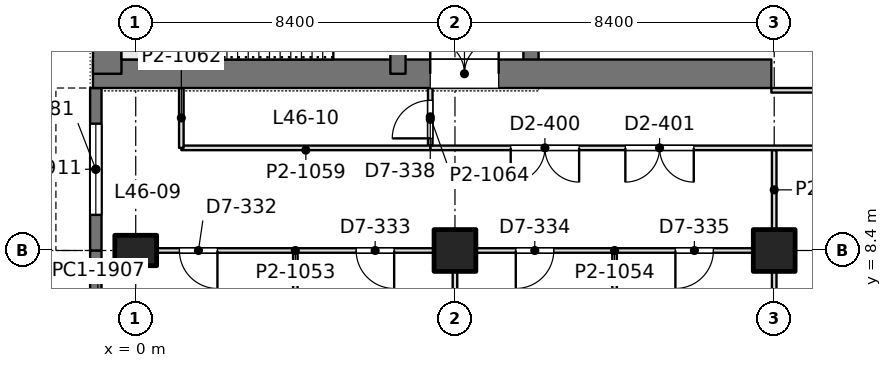
"""IFC4 building model, lengths in metres.
Left out: names, types, materials, properties, quantities, classifications, styles, units other than length and angle.
Written with IfcOpenShell. Run it as: python <this file> out.ifc"""

import sys

from ifc_helpers import new_model, si_unit, direction, frame, frame_2d, origin, origin_2d, place, context, subcontext, project, spatial, rectangle, extrude, element, fill, save


model = new_model("IFC4")
c1 = context("Model", 3, precision=1e-05, world=origin(), true_north=direction((0.0, 1.0)))
c2 = subcontext(c1, "Body", "Model", "MODEL_VIEW")
j1 = project(units=[si_unit("LENGTHUNIT", "METRE"), si_unit("PLANEANGLEUNIT", "RADIAN")], contexts=[c1])
p1 = place(None, origin())
s1 = spatial("IfcSite", under=j1, at=p1, CompositionType="ELEMENT")
p2 = place(p1, origin())
s2 = spatial("IfcBuilding", under=s1, at=p2, CompositionType="ELEMENT")
p3 = place(p2, frame((0.0, 0.0, 202.8)))
s3 = spatial("IfcBuildingStorey", under=s2, at=p3, CompositionType="ELEMENT", Elevation=202.8)
p4 = place(p3, frame((0.0, 8.4, 0.0), z_axis=(0.0, 0.0, 1.0), x_axis=(0.0, 1.0, 0.0)))
e1 = element("IfcColumn", 1, at=p4, inside=s3, PredefinedType="COLUMN", context=c2, shape_type="SweptSolid", body=[
    extrude(rectangle(XDim=0.8, YDim=1.1, at=origin_2d()), origin(), (0.0, 0.0, 1.0), 4.2),
])
for number, where, z_axis, x_axis in (
    (2, (8.4, 8.4, 0.0), (0.0, 0.0, 1.0), (1.0, 0.0, 0.0)),
    (3, (16.8, 8.4, 0.0), (0.0, 0.0, 1.0), (1.0, 0.0, 0.0)),
):
    element("IfcColumn", number, at=place(p3, frame(where, z_axis=z_axis, x_axis=x_axis)), inside=s3, PredefinedType="COLUMN", context=c2, shape_type="SweptSolid", body=[
        extrude(rectangle(XDim=1.1, YDim=1.1, at=origin_2d()), origin(), (0.0, 0.0, 1.0), 4.2),
    ])
p5 = place(p3, frame((-1.125, 13.05, 0.0), z_axis=(0.0, 0.0, 1.0), x_axis=(1.0, 0.0, 0.0)))
e4 = element("IfcWall", 4, at=p5, inside=s3, PredefinedType="SHEAR", context=c2, shape_type="SweptSolid", body=[
    extrude(rectangle(XDim=17.85, YDim=0.75, at=frame_2d((8.925, 0.0))), origin(), (0.0, 0.0, 1.0), 4.2),
])
p6 = place(p5, frame((8.875, 0.0, 0.0)))
e5 = element("IfcOpeningElement", 5, at=p6, cuts=e4, PredefinedType="OPENING", context=c2, shape_type="SweptSolid", body=[
    extrude(rectangle(XDim=1.8, YDim=2.4, at=frame_2d((0.9, 1.2))), frame((0.0, 0.385, 0.0), z_axis=(0.0, -1.0, 0.0), x_axis=(1.0, 0.0, 0.0)), (0.0, 0.0, 1.0), 0.77),
])
p7 = place(p3, frame((-0.75, 13.05, 0.0), z_axis=(0.0, 0.0, 1.0), x_axis=(0.0, 1.0, 0.0)))
e6 = element("IfcWall", 6, at=p7, inside=s3, PredefinedType="SHEAR", context=c2, shape_type="SweptSolid", body=[
    extrude(rectangle(XDim=24.3, YDim=0.75, at=frame_2d((12.15, 0.0))), origin(), (0.0, 0.0, 1.0), 4.2),
])
p8 = place(p3, frame((6.9, 13.05, 0.0), z_axis=(0.0, 0.0, 1.0), x_axis=(0.0, 1.0, 0.0)))
e7 = element("IfcWall", 7, at=p8, inside=s3, PredefinedType="SHEAR", context=c2, shape_type="SweptSolid", body=[
    extrude(rectangle(XDim=24.3, YDim=0.4, at=frame_2d((12.15, 0.0))), origin(), (0.0, 0.0, 1.0), 4.2),
])
p9 = place(p8, frame((1.3, 0.0, 0.0)))
e8 = element("IfcOpeningElement", 8, at=p9, cuts=e7, PredefinedType="OPENING", context=c2, shape_type="SweptSolid", body=[
    extrude(rectangle(XDim=1.0, YDim=2.2, at=frame_2d((0.5, 1.1))), frame((0.0, 0.21, 0.0), z_axis=(0.0, -1.0, 0.0), x_axis=(1.0, 0.0, 0.0)), (0.0, 0.0, 1.0), 0.42),
])
p10 = place(p8, frame((22.0, 0.0, 0.0)))
e9 = element("IfcOpeningElement", 9, at=p10, cuts=e7, PredefinedType="OPENING", context=c2, shape_type="SweptSolid", body=[
    extrude(rectangle(XDim=1.0, YDim=2.2, at=frame_2d((0.5, 1.1))), frame((0.0, 0.21, 0.0), z_axis=(0.0, -1.0, 0.0), x_axis=(1.0, 0.0, 0.0)), (0.0, 0.0, 1.0), 0.42),
])
p11 = place(p8, frame((5.55, 0.0, 0.0)))
e10 = element("IfcOpeningElement", 10, at=p11, cuts=e7, PredefinedType="OPENING", context=c2, shape_type="SweptSolid", body=[
    extrude(rectangle(XDim=1.0, YDim=2.2, at=frame_2d((0.5, 1.1))), frame((0.0, 0.21, 0.0), z_axis=(0.0, -1.0, 0.0), x_axis=(1.0, 0.0, 0.0)), (0.0, 0.0, 1.0), 0.42),
])
p12 = place(p8, frame((9.55, 0.0, 0.0)))
e11 = element("IfcOpeningElement", 11, at=p12, cuts=e7, PredefinedType="OPENING", context=c2, shape_type="SweptSolid", body=[
    extrude(rectangle(XDim=1.0, YDim=2.2, at=frame_2d((0.5, 1.1))), frame((0.0, 0.21, 0.0), z_axis=(0.0, -1.0, 0.0), x_axis=(1.0, 0.0, 0.0)), (0.0, 0.0, 1.0), 0.42),
])
p13 = place(p8, frame((12.8, 0.0, 0.0)))
e12 = element("IfcOpeningElement", 12, at=p13, cuts=e7, PredefinedType="OPENING", context=c2, shape_type="SweptSolid", body=[
    extrude(rectangle(XDim=1.1, YDim=2.2, at=frame_2d((0.55, 1.1))), frame((0.0, 0.21, 0.0), z_axis=(0.0, -1.0, 0.0), x_axis=(1.0, 0.0, 0.0)), (0.0, 0.0, 1.0), 0.42),
])
p14 = place(p8, frame((15.538, 0.0, 0.0)))
e13 = element("IfcOpeningElement", 13, at=p14, cuts=e7, PredefinedType="OPENING", context=c2, shape_type="SweptSolid", body=[
    extrude(rectangle(XDim=1.1, YDim=2.2, at=frame_2d((0.55, 1.1))), frame((0.0, 0.21, 0.0), z_axis=(0.0, -1.0, 0.0), x_axis=(1.0, 0.0, 0.0)), (0.0, 0.0, 1.0), 0.42),
])
p15 = place(p8, frame((18.262, 0.0, 0.0)))
e14 = element("IfcOpeningElement", 14, at=p15, cuts=e7, PredefinedType="OPENING", context=c2, shape_type="SweptSolid", body=[
    extrude(rectangle(XDim=1.1, YDim=2.2, at=frame_2d((0.55, 1.1))), frame((0.0, 0.21, 0.0), z_axis=(0.0, -1.0, 0.0), x_axis=(1.0, 0.0, 0.0)), (0.0, 0.0, 1.0), 0.42),
])
p16 = place(p3, frame((10.4, 13.05, 0.0), z_axis=(0.0, 0.0, 1.0), x_axis=(0.0, 1.0, 0.0)))
e15 = element("IfcWall", 15, at=p16, inside=s3, PredefinedType="SHEAR", context=c2, shape_type="SweptSolid", body=[
    extrude(rectangle(XDim=24.3, YDim=0.4, at=frame_2d((12.15, 0.0))), origin(), (0.0, 0.0, 1.0), 4.2),
])
p17 = place(p16, frame((15.75, 0.0, 0.0)))
e16 = element("IfcOpeningElement", 16, at=p17, cuts=e15, PredefinedType="OPENING", context=c2, shape_type="SweptSolid", body=[
    extrude(rectangle(XDim=1.1, YDim=2.2, at=frame_2d((0.55, 1.1))), frame((0.0, 0.21, 0.0), z_axis=(0.0, -1.0, 0.0), x_axis=(1.0, 0.0, 0.0)), (0.0, 0.0, 1.0), 0.42),
])
p18 = place(p16, frame((18.6, 0.0, 0.0)))
e17 = element("IfcOpeningElement", 17, at=p18, cuts=e15, PredefinedType="OPENING", context=c2, shape_type="SweptSolid", body=[
    extrude(rectangle(XDim=1.1, YDim=2.2, at=frame_2d((0.55, 1.1))), frame((0.0, 0.21, 0.0), z_axis=(0.0, -1.0, 0.0), x_axis=(1.0, 0.0, 0.0)), (0.0, 0.0, 1.0), 0.42),
])
p19 = place(p16, frame((21.45, 0.0, 0.0)))
e18 = element("IfcOpeningElement", 18, at=p19, cuts=e15, PredefinedType="OPENING", context=c2, shape_type="SweptSolid", body=[
    extrude(rectangle(XDim=1.1, YDim=2.2, at=frame_2d((0.55, 1.1))), frame((0.0, 0.21, 0.0), z_axis=(0.0, -1.0, 0.0), x_axis=(1.0, 0.0, 0.0)), (0.0, 0.0, 1.0), 0.42),
])
p20 = place(p16, frame((8.65, 0.0, 0.0)))
e19 = element("IfcOpeningElement", 19, at=p20, cuts=e15, PredefinedType="OPENING", context=c2, shape_type="SweptSolid", body=[
    extrude(rectangle(XDim=1.8, YDim=2.4, at=frame_2d((0.9, 1.2))), frame((0.0, 0.21, 0.0), z_axis=(0.0, -1.0, 0.0), x_axis=(1.0, 0.0, 0.0)), (0.0, 0.0, 1.0), 0.42),
])
p21 = place(p3, frame((-1.05, 5.915, 0.0), z_axis=(0.0, 0.0, 1.0), x_axis=(0.0, 1.0, 0.0)))
e20 = element("IfcWall", 20, at=p21, inside=s3, PredefinedType="SOLIDWALL", context=c2, shape_type="SweptSolid", body=[
    extrude(rectangle(XDim=2.485, YDim=0.3, at=frame_2d((1.243, 0.0))), origin(), (0.0, 0.0, 1.0), 4.05),
])
p22 = place(p3, frame((-1.05, 8.4, 0.0), z_axis=(0.0, 0.0, 1.0), x_axis=(0.0, 1.0, 0.0)))
e21 = element("IfcWall", 21, at=p22, inside=s3, PredefinedType="SOLIDWALL", context=c2, shape_type="SweptSolid", body=[
    extrude(rectangle(XDim=4.275, YDim=0.3, at=frame_2d((2.138, 0.0))), origin(), (0.0, 0.0, 1.0), 4.05),
])
p23 = place(p22, frame((0.938, 0.0, 0.9)))
e22 = element("IfcOpeningElement", 22, at=p23, cuts=e21, PredefinedType="OPENING", context=c2, shape_type="SweptSolid", body=[
    extrude(rectangle(XDim=2.4, YDim=1.9, at=frame_2d((1.2, 0.95))), frame((0.0, 0.16, 0.0), z_axis=(0.0, -1.0, 0.0), x_axis=(1.0, 0.0, 0.0)), (0.0, 0.0, 1.0), 0.32),
])
p24 = place(p3, frame((0.549, 8.4, 0.0), z_axis=(0.0, 0.0, 1.0), x_axis=(1.0, 0.0, 0.0)))
e23 = element("IfcWall", 23, at=p24, inside=s3, PredefinedType="PARTITIONING", context=c2, shape_type="SweptSolid", body=[
    extrude(rectangle(XDim=7.302, YDim=0.12, at=frame_2d((3.651, 0.0))), origin(), (0.0, 0.0, 1.0), 3.55),
])
p25 = place(p24, frame((0.601, 0.0, 0.0)))
e24 = element("IfcOpeningElement", 24, at=p25, cuts=e23, PredefinedType="OPENING", context=c2, shape_type="SweptSolid", body=[
    extrude(rectangle(XDim=1.0, YDim=2.4, at=frame_2d((0.5, 1.2))), frame((0.0, 0.07, 0.0), z_axis=(0.0, -1.0, 0.0), x_axis=(1.0, 0.0, 0.0)), (0.0, 0.0, 1.0), 0.14),
])
p26 = place(p24, frame((5.251, 0.0, 0.0)))
e25 = element("IfcOpeningElement", 25, at=p26, cuts=e23, PredefinedType="OPENING", context=c2, shape_type="SweptSolid", body=[
    extrude(rectangle(XDim=1.0, YDim=2.4, at=frame_2d((0.5, 1.2))), frame((0.0, 0.07, 0.0), z_axis=(0.0, -1.0, 0.0), x_axis=(1.0, 0.0, 0.0)), (0.0, 0.0, 1.0), 0.14),
])
p27 = place(p3, frame((8.949, 8.4, 0.0), z_axis=(0.0, 0.0, 1.0), x_axis=(1.0, 0.0, 0.0)))
e26 = element("IfcWall", 26, at=p27, inside=s3, PredefinedType="PARTITIONING", context=c2, shape_type="SweptSolid", body=[
    extrude(rectangle(XDim=7.302, YDim=0.12, at=frame_2d((3.651, 0.0))), origin(), (0.0, 0.0, 1.0), 3.55),
])
p28 = place(p27, frame((1.051, 0.0, 0.0)))
e27 = element("IfcOpeningElement", 27, at=p28, cuts=e26, PredefinedType="OPENING", context=c2, shape_type="SweptSolid", body=[
    extrude(rectangle(XDim=1.0, YDim=2.4, at=frame_2d((0.5, 1.2))), frame((0.0, 0.07, 0.0), z_axis=(0.0, -1.0, 0.0), x_axis=(1.0, 0.0, 0.0)), (0.0, 0.0, 1.0), 0.14),
])
p29 = place(p27, frame((5.251, 0.0, 0.0)))
e28 = element("IfcOpeningElement", 28, at=p29, cuts=e26, PredefinedType="OPENING", context=c2, shape_type="SweptSolid", body=[
    extrude(rectangle(XDim=1.0, YDim=2.4, at=frame_2d((0.5, 1.2))), frame((0.0, 0.07, 0.0), z_axis=(0.0, -1.0, 0.0), x_axis=(1.0, 0.0, 0.0)), (0.0, 0.0, 1.0), 0.14),
])
p30 = place(p3, frame((4.2, 4.7, 0.0), z_axis=(0.0, 0.0, 1.0), x_axis=(0.0, 1.0, 0.0)))
e29 = element("IfcWall", 29, at=p30, inside=s3, PredefinedType="PARTITIONING", context=c2, shape_type="SweptSolid", body=[
    extrude(rectangle(XDim=3.642, YDim=0.12, at=frame_2d((1.821, 0.0))), origin(), (0.0, 0.0, 1.0), 3.55),
])
p31 = place(p3, frame((8.4, 6.149, 0.0), z_axis=(0.0, 0.0, 1.0), x_axis=(0.0, 1.0, 0.0)))
e30 = element("IfcWall", 30, at=p31, inside=s3, PredefinedType="PARTITIONING", context=c2, shape_type="SweptSolid", body=[
    extrude(rectangle(XDim=1.702, YDim=0.12, at=frame_2d((0.851, 0.0))), origin(), (0.0, 0.0, 1.0), 3.69),
])
p32 = place(p3, frame((12.6, 4.7, 0.0), z_axis=(0.0, 0.0, 1.0), x_axis=(0.0, 1.0, 0.0)))
e31 = element("IfcWall", 31, at=p32, inside=s3, PredefinedType="PARTITIONING", context=c2, shape_type="SweptSolid", body=[
    extrude(rectangle(XDim=3.642, YDim=0.12, at=frame_2d((1.821, 0.0))), origin(), (0.0, 0.0, 1.0), 3.55),
])
p33 = place(p3, frame((16.8, 6.149, 0.0), z_axis=(0.0, 0.0, 1.0), x_axis=(0.0, 1.0, 0.0)))
e32 = element("IfcWall", 32, at=p33, inside=s3, PredefinedType="PARTITIONING", context=c2, shape_type="SweptSolid", body=[
    extrude(rectangle(XDim=1.702, YDim=0.12, at=frame_2d((0.851, 0.0))), origin(), (0.0, 0.0, 1.0), 3.69),
])
p34 = place(p3, frame((16.8, 8.949, 0.0), z_axis=(0.0, 0.0, 1.0), x_axis=(0.0, 1.0, 0.0)))
e33 = element("IfcWall", 33, at=p34, inside=s3, PredefinedType="PARTITIONING", context=c2, shape_type="SweptSolid", body=[
    extrude(rectangle(XDim=2.093, YDim=0.12, at=frame_2d((1.046, 0.0))), origin(), (0.0, 0.0, 1.0), 3.69),
])
p35 = place(p3, frame((7.748, 11.1, 0.0), z_axis=(0.0, 0.0, 1.0), x_axis=(1.0, 0.0, 0.0)))
e34 = element("IfcWall", 34, at=p35, inside=s3, PredefinedType="PARTITIONING", context=c2, shape_type="SweptSolid", body=[
    extrude(rectangle(XDim=34.904, YDim=0.12, at=frame_2d((17.452, 0.0))), origin(), (0.0, 0.0, 1.0), 3.55),
])
p36 = place(p35, frame((2.119, 0.0, 0.0)))
e35 = element("IfcOpeningElement", 35, at=p36, cuts=e34, PredefinedType="OPENING", context=c2, shape_type="SweptSolid", body=[
    extrude(rectangle(XDim=1.8, YDim=2.2, at=frame_2d((0.9, 1.1))), frame((0.0, 0.07, 0.0), z_axis=(0.0, -1.0, 0.0), x_axis=(1.0, 0.0, 0.0)), (0.0, 0.0, 1.0), 0.14),
])
p37 = place(p35, frame((5.135, 0.0, 0.0)))
e36 = element("IfcOpeningElement", 36, at=p37, cuts=e34, PredefinedType="OPENING", context=c2, shape_type="SweptSolid", body=[
    extrude(rectangle(XDim=1.8, YDim=2.2, at=frame_2d((0.9, 1.1))), frame((0.0, 0.07, 0.0), z_axis=(0.0, -1.0, 0.0), x_axis=(1.0, 0.0, 0.0)), (0.0, 0.0, 1.0), 0.14),
])
p38 = place(p35, frame((13.752, 0.0, 0.0)))
e37 = element("IfcOpeningElement", 37, at=p38, cuts=e34, PredefinedType="OPENING", context=c2, shape_type="SweptSolid", body=[
    extrude(rectangle(XDim=1.8, YDim=2.2, at=frame_2d((0.9, 1.1))), frame((0.0, 0.07, 0.0), z_axis=(0.0, -1.0, 0.0), x_axis=(1.0, 0.0, 0.0)), (0.0, 0.0, 1.0), 0.14),
])
p39 = place(p35, frame((19.352, 0.0, 0.0)))
e38 = element("IfcOpeningElement", 38, at=p39, cuts=e34, PredefinedType="OPENING", context=c2, shape_type="SweptSolid", body=[
    extrude(rectangle(XDim=1.8, YDim=2.2, at=frame_2d((0.9, 1.1))), frame((0.0, 0.07, 0.0), z_axis=(0.0, -1.0, 0.0), x_axis=(1.0, 0.0, 0.0)), (0.0, 0.0, 1.0), 0.14),
])
p40 = place(p35, frame((27.969, 0.0, 0.0)))
e39 = element("IfcOpeningElement", 39, at=p40, cuts=e34, PredefinedType="OPENING", context=c2, shape_type="SweptSolid", body=[
    extrude(rectangle(XDim=1.8, YDim=2.2, at=frame_2d((0.9, 1.1))), frame((0.0, 0.07, 0.0), z_axis=(0.0, -1.0, 0.0), x_axis=(1.0, 0.0, 0.0)), (0.0, 0.0, 1.0), 0.14),
])
p41 = place(p35, frame((30.985, 0.0, 0.0)))
e40 = element("IfcOpeningElement", 40, at=p41, cuts=e34, PredefinedType="OPENING", context=c2, shape_type="SweptSolid", body=[
    extrude(rectangle(XDim=1.8, YDim=2.2, at=frame_2d((0.9, 1.1))), frame((0.0, 0.07, 0.0), z_axis=(0.0, -1.0, 0.0), x_axis=(1.0, 0.0, 0.0)), (0.0, 0.0, 1.0), 0.14),
])
p42 = place(p3, frame((7.75, 11.158, 0.0), z_axis=(0.0, 0.0, 1.0), x_axis=(0.0, 1.0, 0.0)))
e41 = element("IfcWall", 41, at=p42, inside=s3, PredefinedType="PARTITIONING", context=c2, shape_type="SweptSolid", body=[
    extrude(rectangle(XDim=1.518, YDim=0.12, at=frame_2d((0.759, 0.0))), origin(), (0.0, 0.0, 1.0), 4.05),
])
p43 = place(p42, frame((0.192, 0.0, 0.0)))
e42 = element("IfcOpeningElement", 42, at=p43, cuts=e41, PredefinedType="OPENING", context=c2, shape_type="SweptSolid", body=[
    extrude(rectangle(XDim=1.0, YDim=2.4, at=frame_2d((0.5, 1.2))), frame((0.0, 0.07, 0.0), z_axis=(0.0, -1.0, 0.0), x_axis=(1.0, 0.0, 0.0)), (0.0, 0.0, 1.0), 0.14),
])
p44 = place(p3, frame((1.2, 11.1, 0.0), z_axis=(0.0, 0.0, 1.0), x_axis=(1.0, 0.0, 0.0)))
e43 = element("IfcWall", 43, at=p44, inside=s3, PredefinedType="PARTITIONING", context=c2, shape_type="SweptSolid", body=[
    extrude(rectangle(XDim=6.552, YDim=0.12, at=frame_2d((3.276, 0.0))), origin(), (0.0, 0.0, 1.0), 4.05),
])
p45 = place(p3, frame((1.2, 11.1, 0.0), z_axis=(0.0, 0.0, 1.0), x_axis=(0.0, 1.0, 0.0)))
e44 = element("IfcWall", 44, at=p45, inside=s3, PredefinedType="PARTITIONING", context=c2, shape_type="SweptSolid", body=[
    extrude(rectangle(XDim=1.576, YDim=0.12, at=frame_2d((0.788, 0.0))), origin(), (0.0, 0.0, 1.0), 4.05),
])
p46 = place(p3, frame((16.725, 12.615, 0.0), z_axis=(0.0, 0.0, 1.0), x_axis=(1.0, 0.0, 0.0)))
e45 = element("IfcWall", 45, at=p46, inside=s3, PredefinedType="PARTITIONING", context=c2, shape_type="SweptSolid", body=[
    extrude(rectangle(XDim=16.95, YDim=0.12, at=frame_2d((8.475, 0.0))), origin(), (0.0, 0.0, 1.0), 3.55),
])
p47 = place(p46, frame((7.575, 0.0, 0.0)))
e46 = element("IfcOpeningElement", 46, at=p47, cuts=e45, PredefinedType="OPENING", context=c2, shape_type="SweptSolid", body=[
    extrude(rectangle(XDim=1.8, YDim=2.2, at=frame_2d((0.9, 1.1))), frame((0.0, 0.07, 0.0), z_axis=(0.0, -1.0, 0.0), x_axis=(1.0, 0.0, 0.0)), (0.0, 0.0, 1.0), 0.14),
])
p48 = place(p23, origin())
e47 = element("IfcWindow", 47, at=p48, inside=s3, PartitioningType="SINGLE_PANEL", PredefinedType="WINDOW", context=c2, shape_type="SweptSolid", body=[
    extrude(rectangle(XDim=2.4, YDim=1.9, at=frame_2d((1.2, 0.95))), frame((0.0, 0.03, 0.0), z_axis=(0.0, -1.0, 0.0), x_axis=(1.0, 0.0, 0.0)), (0.0, 0.0, 1.0), 0.06),
])
fill(e22, e47)
p49 = place(p6, origin())
e48 = element("IfcDoor", 48, at=p49, inside=s3, OperationType="DOUBLE_DOOR_SINGLE_SWING", PredefinedType="DOOR", context=c2, shape_type="SweptSolid", body=[
    extrude(rectangle(XDim=1.8, YDim=2.4, at=frame_2d((0.9, 1.2))), frame((0.0, 0.025, 0.0), z_axis=(0.0, -1.0, 0.0), x_axis=(1.0, 0.0, 0.0)), (0.0, 0.0, 1.0), 0.05),
])
fill(e5, e48)
p50 = place(p25, frame((1.0, 0.0, 0.0), z_axis=(0.0, 0.0, 1.0), x_axis=(-1.0, 0.0, 0.0)))
e49 = element("IfcDoor", 49, at=p50, inside=s3, OperationType="SINGLE_SWING_LEFT", PredefinedType="DOOR", context=c2, shape_type="SweptSolid", body=[
    extrude(rectangle(XDim=1.0, YDim=2.4, at=frame_2d((0.5, 1.2))), frame((0.0, 0.025, 0.0), z_axis=(0.0, -1.0, 0.0), x_axis=(1.0, 0.0, 0.0)), (0.0, 0.0, 1.0), 0.05),
])
fill(e24, e49)
p51 = place(p26, frame((1.0, 0.0, 0.0), z_axis=(0.0, 0.0, 1.0), x_axis=(-1.0, 0.0, 0.0)))
e50 = element("IfcDoor", 50, at=p51, inside=s3, OperationType="SINGLE_SWING_LEFT", PredefinedType="DOOR", context=c2, shape_type="SweptSolid", body=[
    extrude(rectangle(XDim=1.0, YDim=2.4, at=frame_2d((0.5, 1.2))), frame((0.0, 0.025, 0.0), z_axis=(0.0, -1.0, 0.0), x_axis=(1.0, 0.0, 0.0)), (0.0, 0.0, 1.0), 0.05),
])
fill(e25, e50)
p52 = place(p28, frame((1.0, 0.0, 0.0), z_axis=(0.0, 0.0, 1.0), x_axis=(-1.0, 0.0, 0.0)))
e51 = element("IfcDoor", 51, at=p52, inside=s3, OperationType="SINGLE_SWING_RIGHT", PredefinedType="DOOR", context=c2, shape_type="SweptSolid", body=[
    extrude(rectangle(XDim=1.0, YDim=2.4, at=frame_2d((0.5, 1.2))), frame((0.0, 0.025, 0.0), z_axis=(0.0, -1.0, 0.0), x_axis=(1.0, 0.0, 0.0)), (0.0, 0.0, 1.0), 0.05),
])
fill(e27, e51)
p53 = place(p29, frame((1.0, 0.0, 0.0), z_axis=(0.0, 0.0, 1.0), x_axis=(-1.0, 0.0, 0.0)))
e52 = element("IfcDoor", 52, at=p53, inside=s3, OperationType="SINGLE_SWING_RIGHT", PredefinedType="DOOR", context=c2, shape_type="SweptSolid", body=[
    extrude(rectangle(XDim=1.0, YDim=2.4, at=frame_2d((0.5, 1.2))), frame((0.0, 0.025, 0.0), z_axis=(0.0, -1.0, 0.0), x_axis=(1.0, 0.0, 0.0)), (0.0, 0.0, 1.0), 0.05),
])
fill(e28, e52)
p54 = place(p36, frame((1.8, 0.0, 0.0), z_axis=(0.0, 0.0, 1.0), x_axis=(-1.0, 0.0, 0.0)))
e53 = element("IfcDoor", 53, at=p54, inside=s3, OperationType="DOUBLE_DOOR_SINGLE_SWING", PredefinedType="DOOR", context=c2, shape_type="SweptSolid", body=[
    extrude(rectangle(XDim=1.8, YDim=2.2, at=frame_2d((0.9, 1.1))), frame((0.0, 0.025, 0.0), z_axis=(0.0, -1.0, 0.0), x_axis=(1.0, 0.0, 0.0)), (0.0, 0.0, 1.0), 0.05),
])
fill(e35, e53)
p55 = place(p37, frame((1.8, 0.0, 0.0), z_axis=(0.0, 0.0, 1.0), x_axis=(-1.0, 0.0, 0.0)))
e54 = element("IfcDoor", 54, at=p55, inside=s3, OperationType="DOUBLE_DOOR_SINGLE_SWING", PredefinedType="DOOR", context=c2, shape_type="SweptSolid", body=[
    extrude(rectangle(XDim=1.8, YDim=2.2, at=frame_2d((0.9, 1.1))), frame((0.0, 0.025, 0.0), z_axis=(0.0, -1.0, 0.0), x_axis=(1.0, 0.0, 0.0)), (0.0, 0.0, 1.0), 0.05),
])
fill(e36, e54)
p56 = place(p43, origin())
e55 = element("IfcDoor", 55, at=p56, inside=s3, OperationType="SINGLE_SWING_LEFT", PredefinedType="DOOR", context=c2, shape_type="SweptSolid", body=[
    extrude(rectangle(XDim=1.0, YDim=2.4, at=frame_2d((0.5, 1.2))), frame((0.0, 0.025, 0.0), z_axis=(0.0, -1.0, 0.0), x_axis=(1.0, 0.0, 0.0)), (0.0, 0.0, 1.0), 0.05),
])
fill(e42, e55)
save(model, sys.argv[1])
